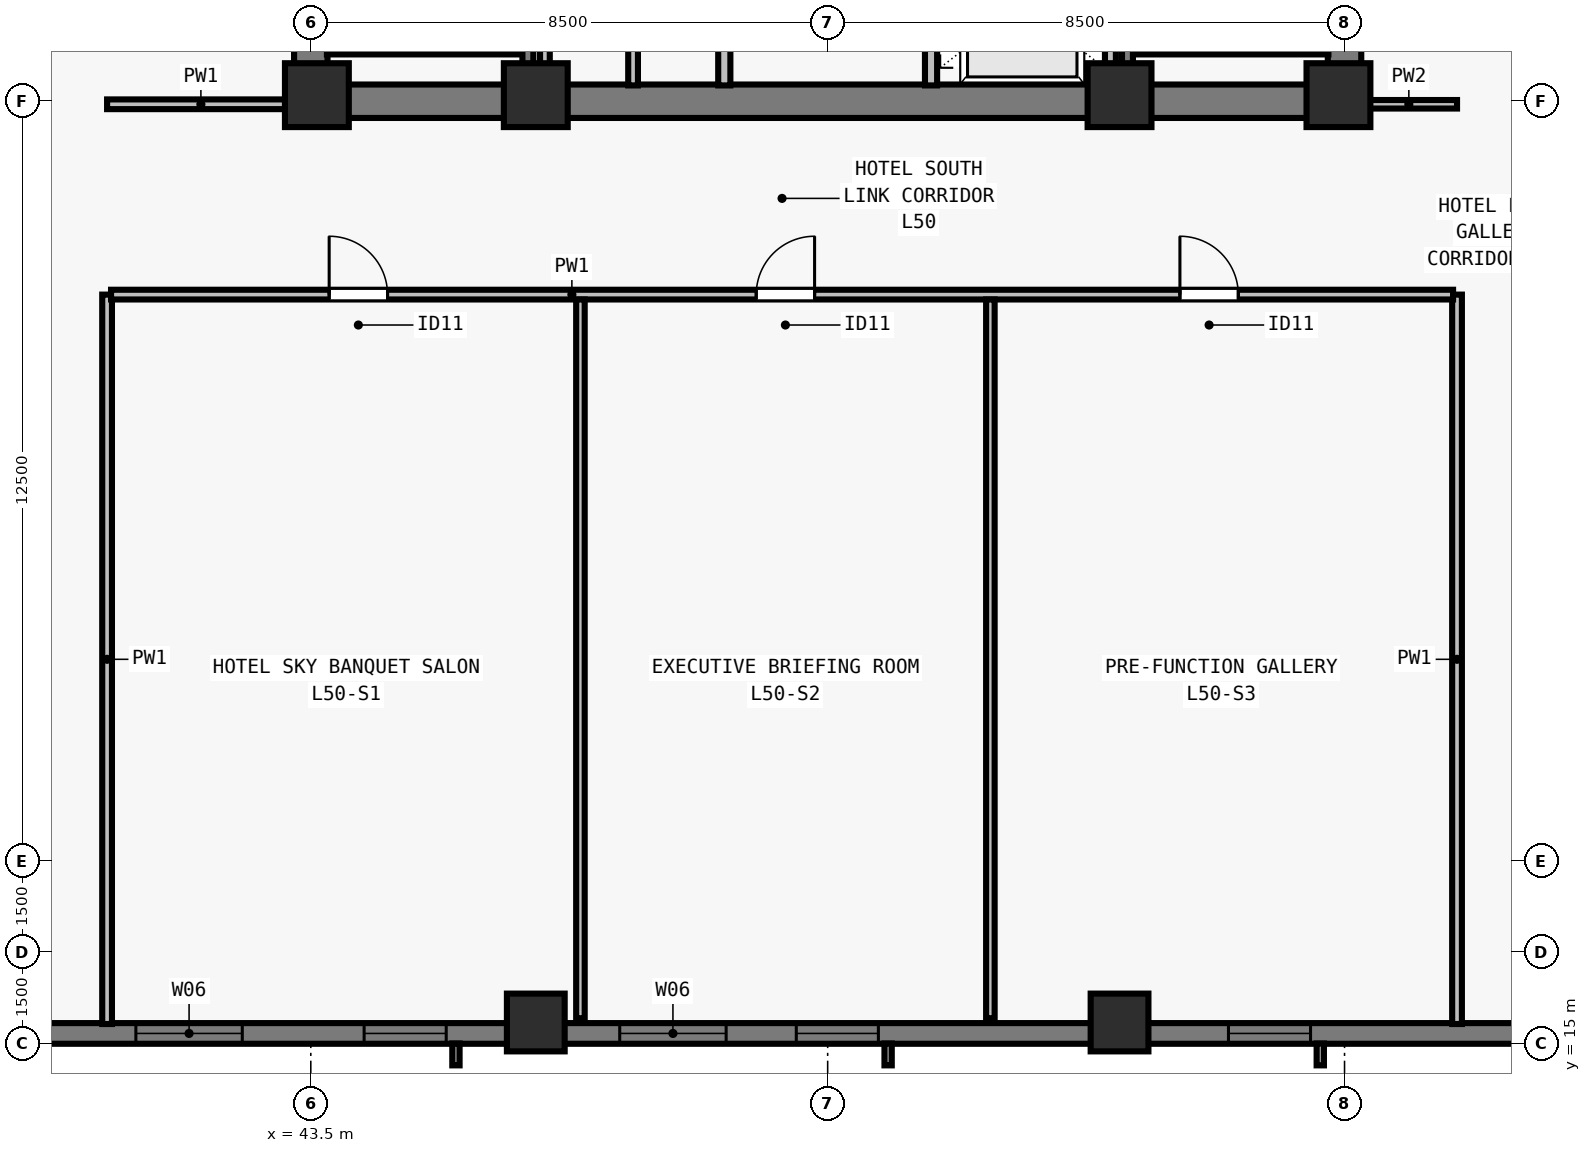
"""IFC4 building model, lengths in metres.
Left out: names, types, materials, properties, quantities, classifications, styles, units other than length and angle.
Written with IfcOpenShell. Run it as: python <this file> out.ifc"""

import sys

from ifc_helpers import new_model, si_unit, direction, frame, frame_2d, origin, origin_2d, place, context, subcontext, project, spatial, rectangle, extrude, element, fill, save


model = new_model("IFC4")
c1 = context("Model", 3, precision=1e-05, world=origin(), true_north=direction((0.0, 1.0)))
c2 = subcontext(c1, "Body", "Model", "MODEL_VIEW")
j1 = project(units=[si_unit("LENGTHUNIT", "METRE"), si_unit("PLANEANGLEUNIT", "RADIAN")], contexts=[c1])
p1 = place(None, origin())
s1 = spatial("IfcSite", under=j1, at=p1, CompositionType="ELEMENT")
p2 = place(p1, origin())
s2 = spatial("IfcBuilding", under=s1, at=p2, CompositionType="ELEMENT")
p3 = place(p2, frame((0.0, 0.0, 183.0)))
s3 = spatial("IfcBuildingStorey", under=s2, at=p3, CompositionType="ELEMENT", Elevation=183.0)
for number, where, z_axis, x_axis in (
    (1, (43.6, 30.6, 0.0), (0.0, 0.0, 1.0), (1.0, 0.0, 0.0)),
    (2, (47.2, 30.6, 0.0), (0.0, 0.0, 1.0), (1.0, 0.0, 0.0)),
    (3, (56.8, 30.6, 0.0), (0.0, 0.0, 1.0), (1.0, 0.0, 0.0)),
    (4, (60.4, 30.6, 0.0), (0.0, 0.0, 1.0), (1.0, 0.0, 0.0)),
):
    element("IfcColumn", number, at=place(p3, frame(where, z_axis=z_axis, x_axis=x_axis)), inside=s3, PredefinedType="COLUMN", context=c2, shape_type="SweptSolid", body=[
        extrude(rectangle(XDim=1.05, YDim=1.05, at=origin_2d()), origin(), (0.0, 0.0, 1.0), 3.5),
    ])
for number, where, z_axis, x_axis in (
    (5, (47.2, 15.35, 0.0), (0.0, 0.0, 1.0), (1.0, 0.0, 0.0)),
    (6, (56.8, 15.35, 0.0), (0.0, 0.0, 1.0), (1.0, 0.0, 0.0)),
):
    element("IfcColumn", number, at=place(p3, frame(where, z_axis=z_axis, x_axis=x_axis)), inside=s3, PredefinedType="COLUMN", context=c2, shape_type="SweptSolid", body=[
        extrude(rectangle(XDim=0.95, YDim=0.95, at=origin_2d()), origin(), (0.0, 0.0, 1.0), 3.5),
    ])
p4 = place(p3, frame((72.0, 15.17, 0.0), z_axis=(0.0, 0.0, 1.0), x_axis=(-1.0, 0.0, 0.0)))
e7 = element("IfcWall", 7, at=p4, inside=s3, PredefinedType="SOLIDWALL", context=c2, shape_type="SweptSolid", body=[
    extrude(rectangle(XDim=39.682, YDim=0.34, at=frame_2d((19.841, 0.0))), origin(), (0.0, 0.0, 1.0), 3.28),
])
p5 = place(p4, frame((5.802, 0.0, 0.8)))
e8 = element("IfcOpeningElement", 8, at=p5, cuts=e7, PredefinedType="OPENING", context=c2, shape_type="SweptSolid", body=[
    extrude(rectangle(XDim=1.35, YDim=1.66, at=frame_2d((0.675, 0.83))), frame((0.0, 0.18, 0.0), z_axis=(0.0, -1.0, 0.0), x_axis=(1.0, 0.0, 0.0)), (0.0, 0.0, 1.0), 0.36),
])
p6 = place(p4, frame((12.059, 0.0, 0.8)))
e9 = element("IfcOpeningElement", 9, at=p6, cuts=e7, PredefinedType="OPENING", context=c2, shape_type="SweptSolid", body=[
    extrude(rectangle(XDim=1.35, YDim=1.66, at=frame_2d((0.675, 0.83))), frame((0.0, 0.18, 0.0), z_axis=(0.0, -1.0, 0.0), x_axis=(1.0, 0.0, 0.0)), (0.0, 0.0, 1.0), 0.36),
])
p7 = place(p4, frame((19.166, 0.0, 0.8)))
e10 = element("IfcOpeningElement", 10, at=p7, cuts=e7, PredefinedType="OPENING", context=c2, shape_type="SweptSolid", body=[
    extrude(rectangle(XDim=1.35, YDim=1.66, at=frame_2d((0.675, 0.83))), frame((0.0, 0.18, 0.0), z_axis=(0.0, -1.0, 0.0), x_axis=(1.0, 0.0, 0.0)), (0.0, 0.0, 1.0), 0.36),
])
p8 = place(p4, frame((21.67, 0.0, 0.8)))
e11 = element("IfcOpeningElement", 11, at=p8, cuts=e7, PredefinedType="OPENING", context=c2, shape_type="SweptSolid", body=[
    extrude(rectangle(XDim=1.75, YDim=1.66, at=frame_2d((0.875, 0.83))), frame((0.0, 0.18, 0.0), z_axis=(0.0, -1.0, 0.0), x_axis=(1.0, 0.0, 0.0)), (0.0, 0.0, 1.0), 0.36),
])
p9 = place(p4, frame((26.273, 0.0, 0.8)))
e12 = element("IfcOpeningElement", 12, at=p9, cuts=e7, PredefinedType="OPENING", context=c2, shape_type="SweptSolid", body=[
    extrude(rectangle(XDim=1.35, YDim=1.66, at=frame_2d((0.675, 0.83))), frame((0.0, 0.18, 0.0), z_axis=(0.0, -1.0, 0.0), x_axis=(1.0, 0.0, 0.0)), (0.0, 0.0, 1.0), 0.36),
])
p10 = place(p4, frame((29.627, 0.0, 0.8)))
e13 = element("IfcOpeningElement", 13, at=p10, cuts=e7, PredefinedType="OPENING", context=c2, shape_type="SweptSolid", body=[
    extrude(rectangle(XDim=1.75, YDim=1.66, at=frame_2d((0.875, 0.83))), frame((0.0, 0.18, 0.0), z_axis=(0.0, -1.0, 0.0), x_axis=(1.0, 0.0, 0.0)), (0.0, 0.0, 1.0), 0.36),
])
p11 = place(p3, frame((43.225, 30.5, 0.0), z_axis=(0.0, 0.0, 1.0), x_axis=(1.0, 0.0, 0.0)))
e14 = element("IfcWall", 14, at=p11, inside=s3, PredefinedType="SHEAR", context=c2, shape_type="SweptSolid", body=[
    extrude(rectangle(XDim=17.55, YDim=0.55, at=frame_2d((8.775, 0.0))), origin(), (0.0, 0.0, 1.0), 3.28),
])
for number, where, z_axis, x_axis in (
    (15, (43.5, 30.765, 0.0), (0.0, 0.0, 1.0), (0.0, 1.0, 0.0)),
    (16, (60.5, 30.765, 0.0), (0.0, 0.0, 1.0), (0.0, 1.0, 0.0)),
):
    element("IfcWall", number, at=place(p3, frame(where, z_axis=z_axis, x_axis=x_axis)), inside=s3, PredefinedType="SHEAR", context=c2, shape_type="SweptSolid", body=[
        extrude(rectangle(XDim=7.985, YDim=0.55, at=frame_2d((3.993, 0.0))), origin(), (0.0, 0.0, 1.0), 3.28),
    ])
p12 = place(p3, frame((50.3, 30.76, 0.0), z_axis=(0.0, 0.0, 1.0), x_axis=(0.0, 1.0, 0.0)))
e17 = element("IfcWall", 17, at=p12, inside=s3, PredefinedType="SOLIDWALL", context=c2, shape_type="SweptSolid", body=[
    extrude(rectangle(XDim=7.855, YDim=0.2, at=frame_2d((3.927, 0.0))), origin(), (0.0, 0.0, 1.0), 3.28),
])
p13 = place(p12, frame((2.09, 0.0, 0.0)))
e18 = element("IfcOpeningElement", 18, at=p13, cuts=e17, PredefinedType="OPENING", context=c2, shape_type="SweptSolid", body=[
    extrude(rectangle(XDim=0.95, YDim=2.12, at=frame_2d((0.475, 1.06))), frame((0.0, 0.11, 0.0), z_axis=(0.0, -1.0, 0.0), x_axis=(1.0, 0.0, 0.0)), (0.0, 0.0, 1.0), 0.22),
])
p14 = place(p3, frame((53.7, 30.76, 0.0), z_axis=(0.0, 0.0, 1.0), x_axis=(0.0, 1.0, 0.0)))
e19 = element("IfcWall", 19, at=p14, inside=s3, PredefinedType="SOLIDWALL", context=c2, shape_type="SweptSolid", body=[
    extrude(rectangle(XDim=7.855, YDim=0.2, at=frame_2d((3.927, 0.0))), origin(), (0.0, 0.0, 1.0), 3.28),
])
p15 = place(p14, frame((0.79, 0.0, 0.0)))
e20 = element("IfcOpeningElement", 20, at=p15, cuts=e19, PredefinedType="OPENING", context=c2, shape_type="SweptSolid", body=[
    extrude(rectangle(XDim=1.1, YDim=2.2, at=frame_2d((0.55, 1.1))), frame((0.0, 0.11, 0.0), z_axis=(0.0, -1.0, 0.0), x_axis=(1.0, 0.0, 0.0)), (0.0, 0.0, 1.0), 0.22),
])
p16 = place(p14, frame((3.49, 0.0, 0.0)))
e21 = element("IfcOpeningElement", 21, at=p16, cuts=e19, PredefinedType="OPENING", context=c2, shape_type="SweptSolid", body=[
    extrude(rectangle(XDim=1.1, YDim=2.2, at=frame_2d((0.55, 1.1))), frame((0.0, 0.11, 0.0), z_axis=(0.0, -1.0, 0.0), x_axis=(1.0, 0.0, 0.0)), (0.0, 0.0, 1.0), 0.22),
])
p17 = place(p14, frame((6.19, 0.0, 0.0)))
e22 = element("IfcOpeningElement", 22, at=p17, cuts=e19, PredefinedType="OPENING", context=c2, shape_type="SweptSolid", body=[
    extrude(rectangle(XDim=1.1, YDim=2.2, at=frame_2d((0.55, 1.1))), frame((0.0, 0.11, 0.0), z_axis=(0.0, -1.0, 0.0), x_axis=(1.0, 0.0, 0.0)), (0.0, 0.0, 1.0), 0.22),
])
p18 = place(p3, frame((47.35, 30.76, 0.0), z_axis=(0.0, 0.0, 1.0), x_axis=(0.0, 1.0, 0.0)))
e23 = element("IfcWall", 23, at=p18, inside=s3, PredefinedType="PARTITIONING", context=c2, shape_type="SweptSolid", body=[
    extrude(rectangle(XDim=7.855, YDim=0.16, at=frame_2d((3.927, 0.0))), origin(), (0.0, 0.0, 1.0), 3.28),
])
p19 = place(p3, frame((48.8, 30.76, 0.0), z_axis=(0.0, 0.0, 1.0), x_axis=(0.0, 1.0, 0.0)))
e24 = element("IfcWall", 24, at=p19, inside=s3, PredefinedType="PARTITIONING", context=c2, shape_type="SweptSolid", body=[
    extrude(rectangle(XDim=7.855, YDim=0.16, at=frame_2d((3.927, 0.0))), origin(), (0.0, 0.0, 1.0), 3.28),
])
p20 = place(p19, frame((3.49, 0.0, 0.0)))
e25 = element("IfcOpeningElement", 25, at=p20, cuts=e24, PredefinedType="OPENING", context=c2, shape_type="SweptSolid", body=[
    extrude(rectangle(XDim=0.85, YDim=2.12, at=frame_2d((0.425, 1.06))), frame((0.0, 0.09, 0.0), z_axis=(0.0, -1.0, 0.0), x_axis=(1.0, 0.0, 0.0)), (0.0, 0.0, 1.0), 0.18),
])
p21 = place(p3, frame((56.65, 30.76, 0.0), z_axis=(0.0, 0.0, 1.0), x_axis=(0.0, 1.0, 0.0)))
e26 = element("IfcWall", 26, at=p21, inside=s3, PredefinedType="SOLIDWALL", context=c2, shape_type="SweptSolid", body=[
    extrude(rectangle(XDim=7.855, YDim=0.18, at=frame_2d((3.927, 0.0))), origin(), (0.0, 0.0, 1.0), 3.28),
])
p22 = place(p3, frame((40.15, 15.325, 0.0), z_axis=(0.0, 0.0, 1.0), x_axis=(0.0, 1.0, 0.0)))
e27 = element("IfcWall", 27, at=p22, inside=s3, PredefinedType="PARTITIONING", context=c2, shape_type="SweptSolid", body=[
    extrude(rectangle(XDim=11.995, YDim=0.16, at=frame_2d((5.998, 0.0))), origin(), (0.0, 0.0, 1.0), 2.555),
])
p23 = place(p3, frame((40.15, 30.45, 0.0), z_axis=(0.0, 0.0, 1.0), x_axis=(1.0, 0.0, 0.0)))
e28 = element("IfcWall", 28, at=p23, inside=s3, PredefinedType="PARTITIONING", context=c2, shape_type="SweptSolid", body=[
    extrude(rectangle(XDim=3.085, YDim=0.16, at=frame_2d((1.542, 0.0))), origin(), (0.0, 0.0, 1.0), 3.28),
])
p24 = place(p3, frame((62.35, 15.325, 0.0), z_axis=(0.0, 0.0, 1.0), x_axis=(0.0, 1.0, 0.0)))
e29 = element("IfcWall", 29, at=p24, inside=s3, PredefinedType="PARTITIONING", context=c2, shape_type="SweptSolid", body=[
    extrude(rectangle(XDim=11.995, YDim=0.16, at=frame_2d((5.998, 0.0))), origin(), (0.0, 0.0, 1.0), 3.28),
])
p25 = place(p3, frame((60.765, 30.45, 0.0), z_axis=(0.0, 0.0, 1.0), x_axis=(1.0, 0.0, 0.0)))
e30 = element("IfcWall", 30, at=p25, inside=s3, PredefinedType="PARTITIONING", context=c2, shape_type="SweptSolid", body=[
    extrude(rectangle(XDim=1.585, YDim=0.14, at=frame_2d((0.792, 0.0))), origin(), (0.0, 0.0, 1.0), 3.28),
])
p26 = place(p3, frame((40.215, 27.32, 0.0), z_axis=(0.0, 0.0, 1.0), x_axis=(1.0, 0.0, 0.0)))
e31 = element("IfcWall", 31, at=p26, inside=s3, PredefinedType="PARTITIONING", context=c2, shape_type="SweptSolid", body=[
    extrude(rectangle(XDim=22.07, YDim=0.16, at=frame_2d((11.035, 0.0))), origin(), (0.0, 0.0, 1.0), 3.28),
])
p27 = place(p26, frame((3.587, 0.0, 0.0)))
e32 = element("IfcOpeningElement", 32, at=p27, cuts=e31, PredefinedType="OPENING", context=c2, shape_type="SweptSolid", body=[
    extrude(rectangle(XDim=0.96, YDim=2.12, at=frame_2d((0.48, 1.06))), frame((0.0, 0.09, 0.0), z_axis=(0.0, -1.0, 0.0), x_axis=(1.0, 0.0, 0.0)), (0.0, 0.0, 1.0), 0.18),
])
p28 = place(p26, frame((10.61, 0.0, 0.0)))
e33 = element("IfcOpeningElement", 33, at=p28, cuts=e31, PredefinedType="OPENING", context=c2, shape_type="SweptSolid", body=[
    extrude(rectangle(XDim=0.96, YDim=2.12, at=frame_2d((0.48, 1.06))), frame((0.0, 0.09, 0.0), z_axis=(0.0, -1.0, 0.0), x_axis=(1.0, 0.0, 0.0)), (0.0, 0.0, 1.0), 0.18),
])
p29 = place(p26, frame((17.578, 0.0, 0.0)))
e34 = element("IfcOpeningElement", 34, at=p29, cuts=e31, PredefinedType="OPENING", context=c2, shape_type="SweptSolid", body=[
    extrude(rectangle(XDim=0.96, YDim=2.12, at=frame_2d((0.48, 1.06))), frame((0.0, 0.09, 0.0), z_axis=(0.0, -1.0, 0.0), x_axis=(1.0, 0.0, 0.0)), (0.0, 0.0, 1.0), 0.18),
])
p30 = place(p3, frame((47.934, 15.42, 0.0), z_axis=(0.0, 0.0, 1.0), x_axis=(0.0, 1.0, 0.0)))
e35 = element("IfcWall", 35, at=p30, inside=s3, PredefinedType="PARTITIONING", context=c2, shape_type="SweptSolid", body=[
    extrude(rectangle(XDim=11.82, YDim=0.14, at=frame_2d((5.91, 0.0))), origin(), (0.0, 0.0, 1.0), 2.896),
])
p31 = place(p3, frame((54.676, 15.42, 0.0), z_axis=(0.0, 0.0, 1.0), x_axis=(0.0, 1.0, 0.0)))
e36 = element("IfcWall", 36, at=p31, inside=s3, PredefinedType="PARTITIONING", context=c2, shape_type="SweptSolid", body=[
    extrude(rectangle(XDim=11.82, YDim=0.14, at=frame_2d((5.91, 0.0))), origin(), (0.0, 0.0, 1.0), 3.28),
])
p32 = place(p3, frame((43.765, 31.36, 0.0), z_axis=(0.0, 0.0, 1.0), x_axis=(1.0, 0.0, 0.0)))
e37 = element("IfcWall", 37, at=p32, inside=s3, PredefinedType="SOLIDWALL", context=c2, shape_type="SweptSolid", body=[
    extrude(rectangle(XDim=3.23, YDim=0.18, at=frame_2d((1.615, 0.0))), origin(), (0.0, 0.0, 1.0), 3.28),
])
p33 = place(p3, frame((47.07, 38.78, 0.0), z_axis=(0.0, 0.0, 1.0), x_axis=(0.0, -1.0, 0.0)))
e38 = element("IfcWall", 38, at=p33, inside=s3, PredefinedType="SOLIDWALL", context=c2, shape_type="SweptSolid", body=[
    extrude(rectangle(XDim=8.017, YDim=0.18, at=frame_2d((4.009, 0.0))), origin(), (0.0, 0.0, 1.0), 3.28),
])
p34 = place(p3, frame((57.005, 31.36, 0.0), z_axis=(0.0, 0.0, 1.0), x_axis=(1.0, 0.0, 0.0)))
e39 = element("IfcWall", 39, at=p34, inside=s3, PredefinedType="SOLIDWALL", context=c2, shape_type="SweptSolid", body=[
    extrude(rectangle(XDim=3.23, YDim=0.18, at=frame_2d((1.615, 0.0))), origin(), (0.0, 0.0, 1.0), 3.28),
])
p35 = place(p3, frame((56.93, 38.78, 0.0), z_axis=(0.0, 0.0, 1.0), x_axis=(0.0, -1.0, 0.0)))
e40 = element("IfcWall", 40, at=p35, inside=s3, PredefinedType="SOLIDWALL", context=c2, shape_type="SweptSolid", body=[
    extrude(rectangle(XDim=8.017, YDim=0.18, at=frame_2d((4.009, 0.0))), origin(), (0.0, 0.0, 1.0), 3.28),
])
p36 = place(p6, origin())
e41 = element("IfcWindow", 41, at=p36, inside=s3, PartitioningType="SINGLE_PANEL", PredefinedType="WINDOW", context=c2, shape_type="SweptSolid", body=[
    extrude(rectangle(XDim=1.35, YDim=1.66, at=frame_2d((0.675, 0.83))), frame((0.0, -0.05, 0.0), z_axis=(0.0, -1.0, 0.0), x_axis=(1.0, 0.0, 0.0)), (0.0, 0.0, 1.0), 0.06),
])
fill(e9, e41)
p37 = place(p7, origin())
e42 = element("IfcWindow", 42, at=p37, inside=s3, PartitioningType="SINGLE_PANEL", PredefinedType="WINDOW", context=c2, shape_type="SweptSolid", body=[
    extrude(rectangle(XDim=1.35, YDim=1.66, at=frame_2d((0.675, 0.83))), frame((0.0, -0.05, 0.0), z_axis=(0.0, -1.0, 0.0), x_axis=(1.0, 0.0, 0.0)), (0.0, 0.0, 1.0), 0.06),
])
fill(e10, e42)
p38 = place(p8, origin())
e43 = element("IfcWindow", 43, at=p38, inside=s3, PartitioningType="SINGLE_PANEL", PredefinedType="WINDOW", context=c2, shape_type="SweptSolid", body=[
    extrude(rectangle(XDim=1.75, YDim=1.66, at=frame_2d((0.875, 0.83))), frame((0.0, -0.05, 0.0), z_axis=(0.0, -1.0, 0.0), x_axis=(1.0, 0.0, 0.0)), (0.0, 0.0, 1.0), 0.06),
])
fill(e11, e43)
p39 = place(p9, origin())
e44 = element("IfcWindow", 44, at=p39, inside=s3, PartitioningType="SINGLE_PANEL", PredefinedType="WINDOW", context=c2, shape_type="SweptSolid", body=[
    extrude(rectangle(XDim=1.35, YDim=1.66, at=frame_2d((0.675, 0.83))), frame((0.0, -0.05, 0.0), z_axis=(0.0, -1.0, 0.0), x_axis=(1.0, 0.0, 0.0)), (0.0, 0.0, 1.0), 0.06),
])
fill(e12, e44)
p40 = place(p10, origin())
e45 = element("IfcWindow", 45, at=p40, inside=s3, PartitioningType="SINGLE_PANEL", PredefinedType="WINDOW", context=c2, shape_type="SweptSolid", body=[
    extrude(rectangle(XDim=1.75, YDim=1.66, at=frame_2d((0.875, 0.83))), frame((0.0, -0.05, 0.0), z_axis=(0.0, -1.0, 0.0), x_axis=(1.0, 0.0, 0.0)), (0.0, 0.0, 1.0), 0.06),
])
fill(e13, e45)
p41 = place(p27, origin())
e46 = element("IfcDoor", 46, at=p41, inside=s3, OperationType="SINGLE_SWING_LEFT", PredefinedType="DOOR", context=c2, shape_type="SweptSolid", body=[
    extrude(rectangle(XDim=0.96, YDim=2.12, at=frame_2d((0.48, 1.06))), frame((0.0, 0.025, 0.0), z_axis=(0.0, -1.0, 0.0), x_axis=(1.0, 0.0, 0.0)), (0.0, 0.0, 1.0), 0.05),
])
fill(e32, e46)
p42 = place(p28, origin())
e47 = element("IfcDoor", 47, at=p42, inside=s3, OperationType="SINGLE_SWING_RIGHT", PredefinedType="DOOR", context=c2, shape_type="SweptSolid", body=[
    extrude(rectangle(XDim=0.96, YDim=2.12, at=frame_2d((0.48, 1.06))), frame((0.0, 0.025, 0.0), z_axis=(0.0, -1.0, 0.0), x_axis=(1.0, 0.0, 0.0)), (0.0, 0.0, 1.0), 0.05),
])
fill(e33, e47)
p43 = place(p29, origin())
e48 = element("IfcDoor", 48, at=p43, inside=s3, OperationType="SINGLE_SWING_LEFT", PredefinedType="DOOR", context=c2, shape_type="SweptSolid", body=[
    extrude(rectangle(XDim=0.96, YDim=2.12, at=frame_2d((0.48, 1.06))), frame((0.0, 0.025, 0.0), z_axis=(0.0, -1.0, 0.0), x_axis=(1.0, 0.0, 0.0)), (0.0, 0.0, 1.0), 0.05),
])
fill(e34, e48)
save(model, sys.argv[1])
